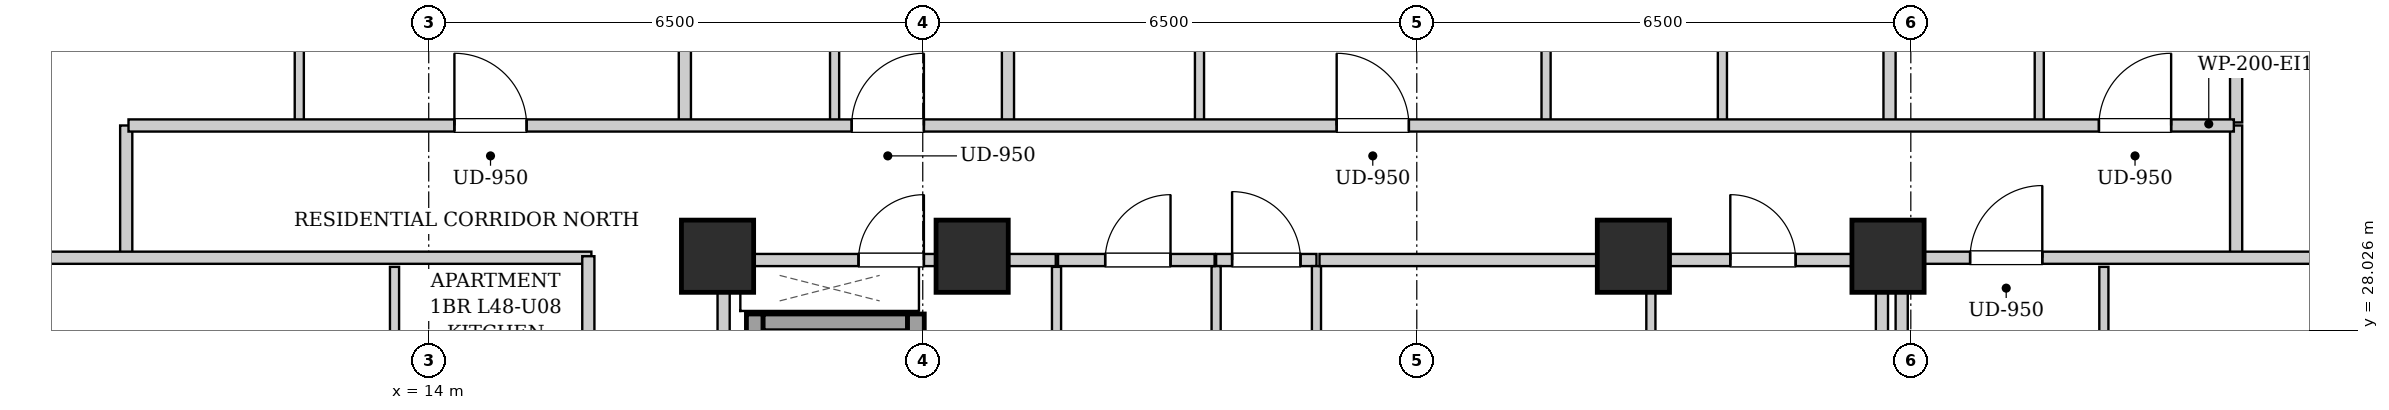
"""IFC4 building model, lengths in metres.
Left out: names, types, materials, properties, quantities, classifications, styles, units other than length and angle.
Written with IfcOpenShell. Run it as: python <this file> out.ifc"""

import sys

from ifc_helpers import new_model, si_unit, direction, frame, frame_2d, origin, origin_2d, place, context, subcontext, project, spatial, rectangle, extrude, element, fill, save


model = new_model("IFC4")
c1 = context("Model", 3, precision=1e-05, world=origin(), true_north=direction((0.0, 1.0)))
c2 = subcontext(c1, "Body", "Model", "MODEL_VIEW")
j1 = project(units=[si_unit("LENGTHUNIT", "METRE"), si_unit("PLANEANGLEUNIT", "RADIAN")], contexts=[c1])
p1 = place(None, origin())
s1 = spatial("IfcSite", under=j1, at=p1, CompositionType="ELEMENT")
p2 = place(p1, origin())
s2 = spatial("IfcBuilding", under=s1, at=p2, CompositionType="ELEMENT")
p3 = place(p2, frame((0.0, 0.0, 166.65)))
s3 = spatial("IfcBuildingStorey", under=s2, at=p3, CompositionType="ELEMENT", Elevation=166.65)
for number, where, z_axis, x_axis in (
    (1, (17.8, 29.0, 0.0), (0.0, 0.0, 1.0), (1.0, 0.0, 0.0)),
    (2, (21.15, 29.0, 0.0), (0.0, 0.0, 1.0), (1.0, 0.0, 0.0)),
    (3, (29.85, 29.0, 0.0), (0.0, 0.0, 1.0), (1.0, 0.0, 0.0)),
    (4, (33.2, 29.0, 0.0), (0.0, 0.0, 1.0), (1.0, 0.0, 0.0)),
):
    element("IfcColumn", number, at=place(p3, frame(where, z_axis=z_axis, x_axis=x_axis)), inside=s3, PredefinedType="COLUMN", context=c2, shape_type="SweptSolid", body=[
        extrude(rectangle(XDim=0.95, YDim=0.95, at=origin_2d()), origin(), (0.0, 0.0, 1.0), 3.25),
    ])
p4 = place(p3, frame((18.29, 24.1, 0.0), z_axis=(0.0, 0.0, 1.0), x_axis=(0.0, 1.0, 0.0)))
e5 = element("IfcWall", 5, at=p4, inside=s3, PredefinedType="SHEAR", context=c2, shape_type="SweptSolid", body=[
    extrude(rectangle(XDim=4.14, YDim=0.22, at=frame_2d((2.07, 0.0))), origin(), (0.0, 0.0, 1.0), 2.93),
])
p5 = place(p3, frame((18.4, 28.13, 0.0), z_axis=(0.0, 0.0, 1.0), x_axis=(1.0, 0.0, 0.0)))
e6 = element("IfcWall", 6, at=p5, inside=s3, PredefinedType="SHEAR", context=c2, shape_type="SweptSolid", body=[
    extrude(rectangle(XDim=1.9, YDim=0.22, at=frame_2d((0.95, 0.0))), origin(), (0.0, 0.0, 1.0), 2.93),
])
p6 = place(p3, frame((20.41, 26.06, 0.0), z_axis=(0.0, 0.0, 1.0), x_axis=(0.0, 1.0, 0.0)))
e7 = element("IfcWall", 7, at=p6, inside=s3, PredefinedType="SHEAR", context=c2, shape_type="SweptSolid", body=[
    extrude(rectangle(XDim=2.18, YDim=0.22, at=frame_2d((1.09, 0.0))), origin(), (0.0, 0.0, 1.0), 2.93),
])
for number, where, z_axis, x_axis in (
    (8, (17.88, 24.12, 0.0), (0.0, 0.0, 1.0), (0.0, 1.0, 0.0)),
    (9, (33.12, 24.12, 0.0), (0.0, 0.0, 1.0), (0.0, 1.0, 0.0)),
):
    element("IfcWall", number, at=place(p3, frame(where, z_axis=z_axis, x_axis=x_axis)), inside=s3, PredefinedType="PARTITIONING", context=c2, shape_type="SweptSolid", body=[
        extrude(rectangle(XDim=4.76, YDim=0.16, at=frame_2d((2.38, 0.0))), origin(), (0.0, 0.0, 1.0), 2.265),
    ])
p7 = place(p3, frame((24.36, 28.95, 0.0), z_axis=(0.0, 0.0, 1.0), x_axis=(1.0, 0.0, 0.0)))
e10 = element("IfcWall", 10, at=p7, inside=s3, PredefinedType="PARTITIONING", context=c2, shape_type="SweptSolid", body=[
    extrude(rectangle(XDim=1.32, YDim=0.16, at=frame_2d((0.66, 0.0))), origin(), (0.0, 0.0, 1.0), 2.382),
])
p8 = place(p7, frame((0.21, 0.0, 0.0)))
e11 = element("IfcOpeningElement", 11, at=p8, cuts=e10, PredefinedType="OPENING", context=c2, shape_type="SweptSolid", body=[
    extrude(rectangle(XDim=0.9, YDim=2.05, at=frame_2d((0.45, 1.025))), frame((0.0, 0.09, 0.0), z_axis=(0.0, -1.0, 0.0), x_axis=(1.0, 0.0, 0.0)), (0.0, 0.0, 1.0), 0.18),
])
p9 = place(p3, frame((17.96, 28.95, 0.0), z_axis=(0.0, 0.0, 1.0), x_axis=(1.0, 0.0, 0.0)))
e12 = element("IfcWall", 12, at=p9, inside=s3, PredefinedType="PARTITIONING", context=c2, shape_type="SweptSolid", body=[
    extrude(rectangle(XDim=4.29, YDim=0.16, at=frame_2d((2.145, 0.0))), origin(), (0.0, 0.0, 1.0), 2.382),
])
p10 = place(p9, frame((1.695, 0.0, 0.0)))
e13 = element("IfcOpeningElement", 13, at=p10, cuts=e12, PredefinedType="OPENING", context=c2, shape_type="SweptSolid", body=[
    extrude(rectangle(XDim=0.86, YDim=2.05, at=frame_2d((0.43, 1.025))), frame((0.0, 0.09, 0.0), z_axis=(0.0, -1.0, 0.0), x_axis=(1.0, 0.0, 0.0)), (0.0, 0.0, 1.0), 0.18),
])
for number, where, z_axis, x_axis in (
    (14, (24.36, 25.0, 0.0), (0.0, 0.0, 1.0), (0.0, 1.0, 0.0)),
    (15, (25.68, 25.0, 0.0), (0.0, 0.0, 1.0), (0.0, 1.0, 0.0)),
):
    element("IfcWall", number, at=place(p3, frame(where, z_axis=z_axis, x_axis=x_axis)), inside=s3, PredefinedType="PARTITIONING", context=c2, shape_type="SweptSolid", body=[
        extrude(rectangle(XDim=3.87, YDim=0.12, at=frame_2d((1.935, 0.0))), origin(), (0.0, 0.0, 1.0), 2.93),
    ])
p11 = place(p3, frame((30.08, 26.18, 0.0), z_axis=(0.0, 0.0, 1.0), x_axis=(0.0, 1.0, 0.0)))
e16 = element("IfcWall", 16, at=p11, inside=s3, PredefinedType="PARTITIONING", context=c2, shape_type="SweptSolid", body=[
    extrude(rectangle(XDim=2.68, YDim=0.12, at=frame_2d((1.34, 0.0))), origin(), (0.0, 0.0, 1.0), 2.93),
])
p12 = place(p3, frame((30.08, 28.95, 0.0), z_axis=(0.0, 0.0, 1.0), x_axis=(1.0, 0.0, 0.0)))
e17 = element("IfcWall", 17, at=p12, inside=s3, PredefinedType="PARTITIONING", context=c2, shape_type="SweptSolid", body=[
    extrude(rectangle(XDim=2.96, YDim=0.16, at=frame_2d((1.48, 0.0))), origin(), (0.0, 0.0, 1.0), 2.93),
])
p13 = place(p12, frame((1.045, 0.0, 0.0)))
e18 = element("IfcOpeningElement", 18, at=p13, cuts=e17, PredefinedType="OPENING", context=c2, shape_type="SweptSolid", body=[
    extrude(rectangle(XDim=0.86, YDim=2.05, at=frame_2d((0.43, 1.025))), frame((0.0, 0.09, 0.0), z_axis=(0.0, -1.0, 0.0), x_axis=(1.0, 0.0, 0.0)), (0.0, 0.0, 1.0), 0.18),
])
p14 = place(p3, frame((22.26, 25.0, 0.0), z_axis=(0.0, 0.0, 1.0), x_axis=(0.0, 1.0, 0.0)))
e19 = element("IfcWall", 19, at=p14, inside=s3, PredefinedType="PARTITIONING", context=c2, shape_type="SweptSolid", body=[
    extrude(rectangle(XDim=3.86, YDim=0.12, at=frame_2d((1.93, 0.0))), origin(), (0.0, 0.0, 1.0), 2.93),
])
p15 = place(p3, frame((22.28, 28.95, 0.0), z_axis=(0.0, 0.0, 1.0), x_axis=(1.0, 0.0, 0.0)))
e20 = element("IfcWall", 20, at=p15, inside=s3, PredefinedType="PARTITIONING", context=c2, shape_type="SweptSolid", body=[
    extrude(rectangle(XDim=2.06, YDim=0.16, at=frame_2d((1.03, 0.0))), origin(), (0.0, 0.0, 1.0), 2.382),
])
p16 = place(p15, frame((0.62, 0.0, 0.0)))
e21 = element("IfcOpeningElement", 21, at=p16, cuts=e20, PredefinedType="OPENING", context=c2, shape_type="SweptSolid", body=[
    extrude(rectangle(XDim=0.86, YDim=2.05, at=frame_2d((0.43, 1.025))), frame((0.0, 0.09, 0.0), z_axis=(0.0, -1.0, 0.0), x_axis=(1.0, 0.0, 0.0)), (0.0, 0.0, 1.0), 0.18),
])
p17 = place(p3, frame((25.72, 28.95, 0.0), z_axis=(0.0, 0.0, 1.0), x_axis=(1.0, 0.0, 0.0)))
e22 = element("IfcWall", 22, at=p17, inside=s3, PredefinedType="PARTITIONING", context=c2, shape_type="SweptSolid", body=[
    extrude(rectangle(XDim=4.32, YDim=0.16, at=frame_2d((2.16, 0.0))), origin(), (0.0, 0.0, 1.0), 2.382),
])
for number, where, z_axis, x_axis in (
    (23, (10.02, 28.98, 0.0), (0.0, 0.0, 1.0), (0.0, 1.0, 0.0)),
    (24, (37.78, 28.98, 0.0), (0.0, 0.0, 1.0), (0.0, 1.0, 0.0)),
):
    element("IfcWall", number, at=place(p3, frame(where, z_axis=z_axis, x_axis=x_axis)), inside=s3, PredefinedType="PARTITIONING", context=c2, shape_type="SweptSolid", body=[
        extrude(rectangle(XDim=1.74, YDim=0.16, at=frame_2d((0.87, 0.0))), origin(), (0.0, 0.0, 1.0), 2.93),
    ])
p18 = place(p3, frame((7.78, 28.98, 0.0), z_axis=(0.0, 0.0, 1.0), x_axis=(1.0, 0.0, 0.0)))
e25 = element("IfcWall", 25, at=p18, inside=s3, PredefinedType="PARTITIONING", context=c2, shape_type="SweptSolid", body=[
    extrude(rectangle(XDim=8.36, YDim=0.16, at=frame_2d((4.18, 0.0))), origin(), (0.0, 0.0, 1.0), 2.382),
])
p19 = place(p3, frame((12.297, 30.76, 0.0), z_axis=(0.0, 0.0, 1.0), x_axis=(0.0, 1.0, 0.0)))
e26 = element("IfcWall", 26, at=p19, inside=s3, PredefinedType="PARTITIONING", context=c2, shape_type="SweptSolid", body=[
    extrude(rectangle(XDim=2.85, YDim=0.12, at=frame_2d((1.425, 0.0))), origin(), (0.0, 0.0, 1.0), 2.93),
])
p20 = place(p19, frame((0.995, 0.0, 0.0)))
e27 = element("IfcOpeningElement", 27, at=p20, cuts=e26, PredefinedType="OPENING", context=c2, shape_type="SweptSolid", body=[
    extrude(rectangle(XDim=0.86, YDim=2.05, at=frame_2d((0.43, 1.025))), frame((0.0, 0.07, 0.0), z_axis=(0.0, -1.0, 0.0), x_axis=(1.0, 0.0, 0.0)), (0.0, 0.0, 1.0), 0.14),
])
p21 = place(p3, frame((17.37, 30.76, 0.0), z_axis=(0.0, 0.0, 1.0), x_axis=(0.0, 1.0, 0.0)))
e28 = element("IfcWall", 28, at=p21, inside=s3, PredefinedType="PARTITIONING", context=c2, shape_type="SweptSolid", body=[
    extrude(rectangle(XDim=12.26, YDim=0.16, at=frame_2d((6.13, 0.0))), origin(), (0.0, 0.0, 1.0), 2.93),
])
p22 = place(p3, frame((19.34, 30.76, 0.0), z_axis=(0.0, 0.0, 1.0), x_axis=(0.0, 1.0, 0.0)))
e29 = element("IfcWall", 29, at=p22, inside=s3, PredefinedType="PARTITIONING", context=c2, shape_type="SweptSolid", body=[
    extrude(rectangle(XDim=2.85, YDim=0.12, at=frame_2d((1.425, 0.0))), origin(), (0.0, 0.0, 1.0), 2.93),
])
p23 = place(p22, frame((0.995, 0.0, 0.0)))
e30 = element("IfcOpeningElement", 30, at=p23, cuts=e29, PredefinedType="OPENING", context=c2, shape_type="SweptSolid", body=[
    extrude(rectangle(XDim=0.86, YDim=2.05, at=frame_2d((0.43, 1.025))), frame((0.0, 0.07, 0.0), z_axis=(0.0, -1.0, 0.0), x_axis=(1.0, 0.0, 0.0)), (0.0, 0.0, 1.0), 0.14),
])
p24 = place(p3, frame((21.621, 30.76, 0.0), z_axis=(0.0, 0.0, 1.0), x_axis=(0.0, 1.0, 0.0)))
e31 = element("IfcWall", 31, at=p24, inside=s3, PredefinedType="PARTITIONING", context=c2, shape_type="SweptSolid", body=[
    extrude(rectangle(XDim=12.26, YDim=0.16, at=frame_2d((6.13, 0.0))), origin(), (0.0, 0.0, 1.0), 2.93),
])
p25 = place(p3, frame((24.141, 30.76, 0.0), z_axis=(0.0, 0.0, 1.0), x_axis=(0.0, 1.0, 0.0)))
e32 = element("IfcWall", 32, at=p25, inside=s3, PredefinedType="PARTITIONING", context=c2, shape_type="SweptSolid", body=[
    extrude(rectangle(XDim=2.85, YDim=0.12, at=frame_2d((1.425, 0.0))), origin(), (0.0, 0.0, 1.0), 2.93),
])
p26 = place(p25, frame((0.995, 0.0, 0.0)))
e33 = element("IfcOpeningElement", 33, at=p26, cuts=e32, PredefinedType="OPENING", context=c2, shape_type="SweptSolid", body=[
    extrude(rectangle(XDim=0.86, YDim=2.05, at=frame_2d((0.43, 1.025))), frame((0.0, 0.07, 0.0), z_axis=(0.0, -1.0, 0.0), x_axis=(1.0, 0.0, 0.0)), (0.0, 0.0, 1.0), 0.14),
])
p27 = place(p3, frame((28.701, 30.76, 0.0), z_axis=(0.0, 0.0, 1.0), x_axis=(0.0, 1.0, 0.0)))
e34 = element("IfcWall", 34, at=p27, inside=s3, PredefinedType="PARTITIONING", context=c2, shape_type="SweptSolid", body=[
    extrude(rectangle(XDim=2.85, YDim=0.12, at=frame_2d((1.425, 0.0))), origin(), (0.0, 0.0, 1.0), 2.93),
])
p28 = place(p27, frame((0.975, 0.0, 0.0)))
e35 = element("IfcOpeningElement", 35, at=p28, cuts=e34, PredefinedType="OPENING", context=c2, shape_type="SweptSolid", body=[
    extrude(rectangle(XDim=0.9, YDim=2.05, at=frame_2d((0.45, 1.025))), frame((0.0, 0.07, 0.0), z_axis=(0.0, -1.0, 0.0), x_axis=(1.0, 0.0, 0.0)), (0.0, 0.0, 1.0), 0.14),
])
p29 = place(p3, frame((31.021, 30.76, 0.0), z_axis=(0.0, 0.0, 1.0), x_axis=(0.0, 1.0, 0.0)))
e36 = element("IfcWall", 36, at=p29, inside=s3, PredefinedType="PARTITIONING", context=c2, shape_type="SweptSolid", body=[
    extrude(rectangle(XDim=2.85, YDim=0.12, at=frame_2d((1.425, 0.0))), origin(), (0.0, 0.0, 1.0), 2.93),
])
p30 = place(p29, frame((0.975, 0.0, 0.0)))
e37 = element("IfcOpeningElement", 37, at=p30, cuts=e36, PredefinedType="OPENING", context=c2, shape_type="SweptSolid", body=[
    extrude(rectangle(XDim=0.9, YDim=2.05, at=frame_2d((0.45, 1.025))), frame((0.0, 0.07, 0.0), z_axis=(0.0, -1.0, 0.0), x_axis=(1.0, 0.0, 0.0)), (0.0, 0.0, 1.0), 0.14),
])
p31 = place(p3, frame((37.78, 30.76, 0.0), z_axis=(0.0, 0.0, 1.0), x_axis=(0.0, 1.0, 0.0)))
e38 = element("IfcWall", 38, at=p31, inside=s3, PredefinedType="PARTITIONING", context=c2, shape_type="SweptSolid", body=[
    extrude(rectangle(XDim=2.91, YDim=0.16, at=frame_2d((1.455, 0.0))), origin(), (0.0, 0.0, 1.0), 2.93),
])
p32 = place(p3, frame((33.22, 30.76, 0.0), z_axis=(0.0, 0.0, 1.0), x_axis=(0.0, 1.0, 0.0)))
e39 = element("IfcWall", 39, at=p32, inside=s3, PredefinedType="PARTITIONING", context=c2, shape_type="SweptSolid", body=[
    extrude(rectangle(XDim=10.28, YDim=0.16, at=frame_2d((5.14, 0.0))), origin(), (0.0, 0.0, 1.0), 2.382),
])
p33 = place(p3, frame((35.19, 30.76, 0.0), z_axis=(0.0, 0.0, 1.0), x_axis=(0.0, 1.0, 0.0)))
e40 = element("IfcWall", 40, at=p33, inside=s3, PredefinedType="PARTITIONING", context=c2, shape_type="SweptSolid", body=[
    extrude(rectangle(XDim=2.85, YDim=0.12, at=frame_2d((1.425, 0.0))), origin(), (0.0, 0.0, 1.0), 2.93),
])
p34 = place(p33, frame((0.995, 0.0, 0.0)))
e41 = element("IfcOpeningElement", 41, at=p34, cuts=e40, PredefinedType="OPENING", context=c2, shape_type="SweptSolid", body=[
    extrude(rectangle(XDim=0.86, YDim=2.05, at=frame_2d((0.43, 1.025))), frame((0.0, 0.07, 0.0), z_axis=(0.0, -1.0, 0.0), x_axis=(1.0, 0.0, 0.0)), (0.0, 0.0, 1.0), 0.14),
])
p35 = place(p3, frame((13.55, 25.052, 0.0), z_axis=(0.0, 0.0, 1.0), x_axis=(0.0, 1.0, 0.0)))
e42 = element("IfcWall", 42, at=p35, inside=s3, PredefinedType="PARTITIONING", context=c2, shape_type="SweptSolid", body=[
    extrude(rectangle(XDim=3.808, YDim=0.12, at=frame_2d((1.904, 0.0))), origin(), (0.0, 0.0, 1.0), 2.93),
])
p36 = place(p35, frame((1.454, 0.0, 0.0)))
e43 = element("IfcOpeningElement", 43, at=p36, cuts=e42, PredefinedType="OPENING", context=c2, shape_type="SweptSolid", body=[
    extrude(rectangle(XDim=0.9, YDim=2.05, at=frame_2d((0.45, 1.025))), frame((0.0, 0.07, 0.0), z_axis=(0.0, -1.0, 0.0), x_axis=(1.0, 0.0, 0.0)), (0.0, 0.0, 1.0), 0.14),
])
p37 = place(p3, frame((33.38, 28.98, 0.0), z_axis=(0.0, 0.0, 1.0), x_axis=(1.0, 0.0, 0.0)))
e44 = element("IfcWall", 44, at=p37, inside=s3, PredefinedType="PARTITIONING", context=c2, shape_type="SweptSolid", body=[
    extrude(rectangle(XDim=6.64, YDim=0.16, at=frame_2d((3.32, 0.0))), origin(), (0.0, 0.0, 1.0), 2.382),
])
p38 = place(p37, frame((0.9, 0.0, 0.0)))
e45 = element("IfcOpeningElement", 45, at=p38, cuts=e44, PredefinedType="OPENING", context=c2, shape_type="SweptSolid", body=[
    extrude(rectangle(XDim=0.95, YDim=2.1, at=frame_2d((0.475, 1.05))), frame((0.0, 0.09, 0.0), z_axis=(0.0, -1.0, 0.0), x_axis=(1.0, 0.0, 0.0)), (0.0, 0.0, 1.0), 0.18),
])
p39 = place(p3, frame((36.04, 25.052, 0.0), z_axis=(0.0, 0.0, 1.0), x_axis=(0.0, 1.0, 0.0)))
e46 = element("IfcWall", 46, at=p39, inside=s3, PredefinedType="PARTITIONING", context=c2, shape_type="SweptSolid", body=[
    extrude(rectangle(XDim=3.808, YDim=0.12, at=frame_2d((1.904, 0.0))), origin(), (0.0, 0.0, 1.0), 2.93),
])
p40 = place(p39, frame((1.454, 0.0, 0.0)))
e47 = element("IfcOpeningElement", 47, at=p40, cuts=e46, PredefinedType="OPENING", context=c2, shape_type="SweptSolid", body=[
    extrude(rectangle(XDim=0.9, YDim=2.05, at=frame_2d((0.45, 1.025))), frame((0.0, 0.07, 0.0), z_axis=(0.0, -1.0, 0.0), x_axis=(1.0, 0.0, 0.0)), (0.0, 0.0, 1.0), 0.14),
])
p41 = place(p3, frame((10.05, 30.72, 0.0), z_axis=(0.0, 0.0, 1.0), x_axis=(1.0, 0.0, 0.0)))
e48 = element("IfcWall", 48, at=p41, inside=s3, PredefinedType="PARTITIONING", context=c2, shape_type="SweptSolid", body=[
    extrude(rectangle(XDim=27.7, YDim=0.16, at=frame_2d((13.85, 0.0))), origin(), (0.0, 0.0, 1.0), 2.93),
])
p42 = place(p41, frame((4.288, 0.0, 0.0)))
e49 = element("IfcOpeningElement", 49, at=p42, cuts=e48, PredefinedType="OPENING", context=c2, shape_type="SweptSolid", body=[
    extrude(rectangle(XDim=0.95, YDim=2.1, at=frame_2d((0.475, 1.05))), frame((0.0, 0.09, 0.0), z_axis=(0.0, -1.0, 0.0), x_axis=(1.0, 0.0, 0.0)), (0.0, 0.0, 1.0), 0.18),
])
p43 = place(p41, frame((9.515, 0.0, 0.0)))
e50 = element("IfcOpeningElement", 50, at=p43, cuts=e48, PredefinedType="OPENING", context=c2, shape_type="SweptSolid", body=[
    extrude(rectangle(XDim=0.95, YDim=2.1, at=frame_2d((0.475, 1.05))), frame((0.0, 0.09, 0.0), z_axis=(0.0, -1.0, 0.0), x_axis=(1.0, 0.0, 0.0)), (0.0, 0.0, 1.0), 0.18),
])
p44 = place(p41, frame((15.896, 0.0, 0.0)))
e51 = element("IfcOpeningElement", 51, at=p44, cuts=e48, PredefinedType="OPENING", context=c2, shape_type="SweptSolid", body=[
    extrude(rectangle(XDim=0.95, YDim=2.1, at=frame_2d((0.475, 1.05))), frame((0.0, 0.09, 0.0), z_axis=(0.0, -1.0, 0.0), x_axis=(1.0, 0.0, 0.0)), (0.0, 0.0, 1.0), 0.18),
])
p45 = place(p41, frame((25.925, 0.0, 0.0)))
e52 = element("IfcOpeningElement", 52, at=p45, cuts=e48, PredefinedType="OPENING", context=c2, shape_type="SweptSolid", body=[
    extrude(rectangle(XDim=0.95, YDim=2.1, at=frame_2d((0.475, 1.05))), frame((0.0, 0.09, 0.0), z_axis=(0.0, -1.0, 0.0), x_axis=(1.0, 0.0, 0.0)), (0.0, 0.0, 1.0), 0.18),
])
p46 = place(p3, frame((16.1, 15.07, 0.0), z_axis=(0.0, 0.0, 1.0), x_axis=(0.0, 1.0, 0.0)))
e53 = element("IfcWall", 53, at=p46, inside=s3, PredefinedType="PARTITIONING", context=c2, shape_type="SweptSolid", body=[
    extrude(rectangle(XDim=13.93, YDim=0.16, at=frame_2d((6.965, 0.0))), origin(), (0.0, 0.0, 1.0), 2.93),
])
p47 = place(p46, frame((4.661, 0.0, 0.0)))
e54 = element("IfcOpeningElement", 54, at=p47, cuts=e53, PredefinedType="OPENING", context=c2, shape_type="SweptSolid", body=[
    extrude(rectangle(XDim=0.95, YDim=2.1, at=frame_2d((0.475, 1.05))), frame((0.0, 0.09, 0.0), z_axis=(0.0, -1.0, 0.0), x_axis=(1.0, 0.0, 0.0)), (0.0, 0.0, 1.0), 0.18),
])
p48 = place(p46, frame((11.411, 0.0, 0.0)))
e55 = element("IfcOpeningElement", 55, at=p48, cuts=e53, PredefinedType="OPENING", context=c2, shape_type="SweptSolid", body=[
    extrude(rectangle(XDim=0.95, YDim=2.1, at=frame_2d((0.475, 1.05))), frame((0.0, 0.09, 0.0), z_axis=(0.0, -1.0, 0.0), x_axis=(1.0, 0.0, 0.0)), (0.0, 0.0, 1.0), 0.18),
])
p49 = place(p3, frame((33.38, 15.02, 0.0), z_axis=(0.0, 0.0, 1.0), x_axis=(0.0, 1.0, 0.0)))
e56 = element("IfcWall", 56, at=p49, inside=s3, PredefinedType="PARTITIONING", context=c2, shape_type="SweptSolid", body=[
    extrude(rectangle(XDim=13.98, YDim=0.16, at=frame_2d((6.99, 0.0))), origin(), (0.0, 0.0, 1.0), 2.265),
])
p50 = place(p8, origin())
e57 = element("IfcDoor", 57, at=p50, inside=s3, OperationType="SINGLE_SWING_LEFT", PredefinedType="DOOR", context=c2, shape_type="SweptSolid", body=[
    extrude(rectangle(XDim=0.9, YDim=2.05, at=frame_2d((0.45, 1.025))), frame((0.0, 0.025, 0.0), z_axis=(0.0, -1.0, 0.0), x_axis=(1.0, 0.0, 0.0)), (0.0, 0.0, 1.0), 0.05),
])
fill(e11, e57)
p51 = place(p10, origin())
e58 = element("IfcDoor", 58, at=p51, inside=s3, OperationType="SINGLE_SWING_RIGHT", PredefinedType="DOOR", context=c2, shape_type="SweptSolid", body=[
    extrude(rectangle(XDim=0.86, YDim=2.05, at=frame_2d((0.43, 1.025))), frame((0.0, 0.025, 0.0), z_axis=(0.0, -1.0, 0.0), x_axis=(1.0, 0.0, 0.0)), (0.0, 0.0, 1.0), 0.05),
])
fill(e13, e58)
p52 = place(p13, origin())
e59 = element("IfcDoor", 59, at=p52, inside=s3, OperationType="SINGLE_SWING_LEFT", PredefinedType="DOOR", context=c2, shape_type="SweptSolid", body=[
    extrude(rectangle(XDim=0.86, YDim=2.05, at=frame_2d((0.43, 1.025))), frame((0.0, 0.025, 0.0), z_axis=(0.0, -1.0, 0.0), x_axis=(1.0, 0.0, 0.0)), (0.0, 0.0, 1.0), 0.05),
])
fill(e18, e59)
p53 = place(p16, origin())
e60 = element("IfcDoor", 60, at=p53, inside=s3, OperationType="SINGLE_SWING_RIGHT", PredefinedType="DOOR", context=c2, shape_type="SweptSolid", body=[
    extrude(rectangle(XDim=0.86, YDim=2.05, at=frame_2d((0.43, 1.025))), frame((0.0, 0.025, 0.0), z_axis=(0.0, -1.0, 0.0), x_axis=(1.0, 0.0, 0.0)), (0.0, 0.0, 1.0), 0.05),
])
fill(e21, e60)
p54 = place(p38, origin())
e61 = element("IfcDoor", 61, at=p54, inside=s3, OperationType="SINGLE_SWING_RIGHT", PredefinedType="DOOR", context=c2, shape_type="SweptSolid", body=[
    extrude(rectangle(XDim=0.95, YDim=2.1, at=frame_2d((0.475, 1.05))), frame((0.0, 0.025, 0.0), z_axis=(0.0, -1.0, 0.0), x_axis=(1.0, 0.0, 0.0)), (0.0, 0.0, 1.0), 0.05),
])
fill(e45, e61)
p55 = place(p42, origin())
e62 = element("IfcDoor", 62, at=p55, inside=s3, OperationType="SINGLE_SWING_LEFT", PredefinedType="DOOR", context=c2, shape_type="SweptSolid", body=[
    extrude(rectangle(XDim=0.95, YDim=2.1, at=frame_2d((0.475, 1.05))), frame((0.0, 0.025, 0.0), z_axis=(0.0, -1.0, 0.0), x_axis=(1.0, 0.0, 0.0)), (0.0, 0.0, 1.0), 0.05),
])
fill(e49, e62)
p56 = place(p43, origin())
e63 = element("IfcDoor", 63, at=p56, inside=s3, OperationType="SINGLE_SWING_RIGHT", PredefinedType="DOOR", context=c2, shape_type="SweptSolid", body=[
    extrude(rectangle(XDim=0.95, YDim=2.1, at=frame_2d((0.475, 1.05))), frame((0.0, 0.025, 0.0), z_axis=(0.0, -1.0, 0.0), x_axis=(1.0, 0.0, 0.0)), (0.0, 0.0, 1.0), 0.05),
])
fill(e50, e63)
p57 = place(p44, origin())
e64 = element("IfcDoor", 64, at=p57, inside=s3, OperationType="SINGLE_SWING_LEFT", PredefinedType="DOOR", context=c2, shape_type="SweptSolid", body=[
    extrude(rectangle(XDim=0.95, YDim=2.1, at=frame_2d((0.475, 1.05))), frame((0.0, 0.025, 0.0), z_axis=(0.0, -1.0, 0.0), x_axis=(1.0, 0.0, 0.0)), (0.0, 0.0, 1.0), 0.05),
])
fill(e51, e64)
p58 = place(p45, origin())
e65 = element("IfcDoor", 65, at=p58, inside=s3, OperationType="SINGLE_SWING_RIGHT", PredefinedType="DOOR", context=c2, shape_type="SweptSolid", body=[
    extrude(rectangle(XDim=0.95, YDim=2.1, at=frame_2d((0.475, 1.05))), frame((0.0, 0.025, 0.0), z_axis=(0.0, -1.0, 0.0), x_axis=(1.0, 0.0, 0.0)), (0.0, 0.0, 1.0), 0.05),
])
fill(e52, e65)
save(model, sys.argv[1])
